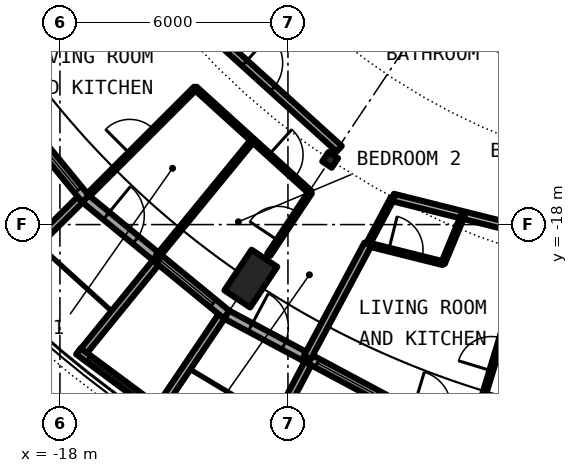
"""IFC4 building model, lengths in metres.
Left out: names, types, materials, properties, quantities, classifications, styles, units other than length and angle.
Written with IfcOpenShell. Run it as: python <this file> out.ifc"""

import sys

from ifc_helpers import new_model, si_unit, direction, frame, frame_2d, origin, origin_2d, place, context, subcontext, project, spatial, rectangle, circle, hollow_circle, i_section, extrude, element, fill, save


model = new_model("IFC4")
c1 = context("Model", 3, precision=1e-05, world=origin(), true_north=direction((0.0, 1.0)))
c2 = subcontext(c1, "Body", "Model", "MODEL_VIEW")
j1 = project(units=[si_unit("LENGTHUNIT", "METRE"), si_unit("PLANEANGLEUNIT", "RADIAN")], contexts=[c1])
p1 = place(None, origin())
s1 = spatial("IfcSite", under=j1, at=p1, CompositionType="ELEMENT")
p2 = place(p1, origin())
s2 = spatial("IfcBuilding", under=s1, at=p2, CompositionType="ELEMENT")
p3 = place(p2, frame((0.0, 0.0, 246.25)))
s3 = spatial("IfcBuildingStorey", under=s2, at=p3, CompositionType="ELEMENT", Elevation=246.25)
p4 = place(p3, frame((-13.334, -19.955, 0.0), z_axis=(0.231767499499, 0.346819263352, 0.908845545043), x_axis=(-0.831436082083, 0.555620411262, 0.0)))
e1 = element("IfcColumn", 1, at=p4, inside=s3, PredefinedType="COLUMN", context=c2, shape_type="SweptSolid", body=[
    extrude(hollow_circle(Radius=0.406, WallThickness=0.03, at=origin_2d()), origin(), (0.0, 0.0, 1.0), 3.081),
])
p5 = place(p3, frame((-10.889, -16.297, 0.0), z_axis=(0.0, 0.0, 1.0), x_axis=(-0.55557023302, -0.831469612303, 0.0)))
e2 = element("IfcColumn", 2, at=p5, inside=s3, PredefinedType="COLUMN", context=c2, shape_type="SweptSolid", body=[
    extrude(i_section(OverallWidth=0.3, OverallDepth=0.3, WebThickness=0.011, FlangeThickness=0.019, FilletRadius=0.027, at=origin_2d()), origin(), (0.0, 0.0, 1.0), 3.05),
])
p6 = place(p3, frame((-20.371, -13.611, 0.0), z_axis=(0.0, 0.0, 1.0), x_axis=(0.634396836208, -0.773007538262, 0.0)))
e3 = element("IfcWall", 3, at=p6, inside=s3, PredefinedType="SOLIDWALL", context=c2, shape_type="SweptSolid", body=[
    extrude(rectangle(XDim=4.803, YDim=0.25, at=frame_2d((2.402, 0.0))), origin(), (0.0, 0.0, 1.0), 2.7),
])
p7 = place(p6, frame((0.704, 0.0, 0.0)))
e4 = element("IfcOpeningElement", 4, at=p7, cuts=e3, PredefinedType="OPENING", context=c2, shape_type="SweptSolid", body=[
    extrude(rectangle(XDim=1.0, YDim=2.2, at=frame_2d((0.5, 1.1))), frame((0.0, 0.135, 0.0), z_axis=(0.0, -1.0, 0.0), x_axis=(1.0, 0.0, 0.0)), (0.0, 0.0, 1.0), 0.27),
])
p8 = place(p6, frame((2.699, 0.0, 0.3)))
e5 = element("IfcOpeningElement", 5, at=p8, cuts=e3, PredefinedType="OPENING", context=c2, shape_type="SweptSolid", body=[
    extrude(rectangle(XDim=1.8, YDim=2.1, at=frame_2d((0.9, 1.05))), frame((0.0, 0.135, 0.0), z_axis=(0.0, -1.0, 0.0), x_axis=(1.0, 0.0, 0.0)), (0.0, 0.0, 1.0), 0.27),
])
p9 = place(p3, frame((-17.47, -17.344, -0.03), z_axis=(0.0, 0.0, 1.0), x_axis=(-0.709896457854, -0.704306055012, 0.0)))
e6 = element("IfcWall", 6, at=p9, inside=s3, PredefinedType="SOLIDWALL", context=c2, shape_type="SweptSolid", body=[
    extrude(rectangle(XDim=2.882, YDim=0.2, at=frame_2d((1.441, 0.0))), origin(), (0.0, 0.0, 1.0), 2.73),
])
p10 = place(p3, frame((-17.324, -17.324, 0.0), z_axis=(0.0, 0.0, 1.0), x_axis=(0.773007538262, -0.634396836208, 0.0)))
e7 = element("IfcWall", 7, at=p10, inside=s3, PredefinedType="SOLIDWALL", context=c2, shape_type="SweptSolid", body=[
    extrude(rectangle(XDim=4.803, YDim=0.25, at=frame_2d((2.402, 0.0))), origin(), (0.0, 0.0, 1.0), 2.7),
])
p11 = place(p10, frame((0.704, 0.0, 0.0)))
e8 = element("IfcOpeningElement", 8, at=p11, cuts=e7, PredefinedType="OPENING", context=c2, shape_type="SweptSolid", body=[
    extrude(rectangle(XDim=1.0, YDim=2.2, at=frame_2d((0.5, 1.1))), frame((0.0, 0.135, 0.0), z_axis=(0.0, -1.0, 0.0), x_axis=(1.0, 0.0, 0.0)), (0.0, 0.0, 1.0), 0.27),
])
p12 = place(p10, frame((2.542, 0.0, 0.3)))
e9 = element("IfcOpeningElement", 9, at=p12, cuts=e7, PredefinedType="OPENING", context=c2, shape_type="SweptSolid", body=[
    extrude(rectangle(XDim=1.8, YDim=2.1, at=frame_2d((0.9, 1.05))), frame((0.0, 0.135, 0.0), z_axis=(0.0, -1.0, 0.0), x_axis=(1.0, 0.0, 0.0)), (0.0, 0.0, 1.0), 0.27),
])
p13 = place(p3, frame((-17.513, -21.332, -0.03), z_axis=(0.0, 0.0, 1.0), x_axis=(0.803211723794, -0.59569365177, 0.0)))
e10 = element("IfcWall", 10, at=p13, inside=s3, PredefinedType="SOLIDWALL", context=c2, shape_type="SweptSolid", body=[
    extrude(rectangle(XDim=2.718, YDim=0.2, at=frame_2d((1.359, 0.0))), origin(), (0.0, 0.0, 1.0), 2.73),
])
p14 = place(p13, frame((0.319, 0.0, 0.33)))
e11 = element("IfcOpeningElement", 11, at=p14, cuts=e10, PredefinedType="OPENING", context=c2, shape_type="SweptSolid", body=[
    extrude(circle(Radius=1.04, at=frame_2d((1.04, 1.04))), frame((0.0, 0.11, 0.0), z_axis=(0.0, -1.0, 0.0), x_axis=(1.0, 0.0, 0.0)), (0.0, 0.0, 1.0), 0.22),
])
p15 = place(p3, frame((-15.479, -19.0, -0.03), z_axis=(0.0, 0.0, 1.0), x_axis=(-0.631209771017, -0.775612161439, 0.0)))
e12 = element("IfcWall", 12, at=p15, inside=s3, PredefinedType="SOLIDWALL", context=c2, shape_type="SweptSolid", body=[
    extrude(rectangle(XDim=2.992, YDim=0.2, at=frame_2d((1.496, 0.0))), origin(), (0.0, 0.0, 1.0), 2.73),
])
p16 = place(p3, frame((-13.75, -20.419, -0.03), z_axis=(0.0, 0.0, 1.0), x_axis=(-0.558934498222, -0.829211810515, 0.0)))
e13 = element("IfcWall", 13, at=p16, inside=s3, PredefinedType="SOLIDWALL", context=c2, shape_type="SweptSolid", body=[
    extrude(rectangle(XDim=2.882, YDim=0.2, at=frame_2d((1.441, 0.0))), origin(), (0.0, 0.0, 1.0), 2.73),
])
p17 = place(p3, frame((-13.611, -20.371, 0.0), z_axis=(0.0, 0.0, 1.0), x_axis=(0.881903608701, -0.471429766731, 0.0)))
e14 = element("IfcWall", 14, at=p17, inside=s3, PredefinedType="SOLIDWALL", context=c2, shape_type="SweptSolid", body=[
    extrude(rectangle(XDim=4.802, YDim=0.25, at=frame_2d((2.401, 0.0))), origin(), (0.0, 0.0, 1.0), 2.7),
])
p18 = place(p17, frame((0.704, 0.0, 0.0)))
e15 = element("IfcOpeningElement", 15, at=p18, cuts=e14, PredefinedType="OPENING", context=c2, shape_type="SweptSolid", body=[
    extrude(rectangle(XDim=1.0, YDim=2.2, at=frame_2d((0.5, 1.1))), frame((0.0, 0.135, 0.0), z_axis=(0.0, -1.0, 0.0), x_axis=(1.0, 0.0, 0.0)), (0.0, 0.0, 1.0), 0.27),
])
p19 = place(p17, frame((2.699, 0.0, 0.3)))
e16 = element("IfcOpeningElement", 16, at=p19, cuts=e14, PredefinedType="OPENING", context=c2, shape_type="SweptSolid", body=[
    extrude(rectangle(XDim=1.8, YDim=2.1, at=frame_2d((0.9, 1.05))), frame((0.0, 0.135, 0.0), z_axis=(0.0, -1.0, 0.0), x_axis=(1.0, 0.0, 0.0)), (0.0, 0.0, 1.0), 0.27),
])
p20 = place(p3, frame((-11.475, -21.655, -0.03), z_axis=(0.0, 0.0, 1.0), x_axis=(-0.467917715158, -0.883772036128, 0.0)))
e17 = element("IfcWall", 17, at=p20, inside=s3, PredefinedType="SOLIDWALL", context=c2, shape_type="SweptSolid", body=[
    extrude(rectangle(XDim=2.992, YDim=0.2, at=frame_2d((1.496, 0.0))), origin(), (0.0, 0.0, 1.0), 2.73),
])
p21 = place(p3, frame((-14.437, -14.409, 0.0), z_axis=(0.0, 0.0, 1.0), x_axis=(0.740802780294, -0.671722592078, 0.0)))
e18 = element("IfcWall", 18, at=p21, inside=s3, PredefinedType="PARTITIONING", context=c2, shape_type="SweptSolid", body=[
    extrude(rectangle(XDim=4.082, YDim=0.1, at=frame_2d((2.041, 0.0))), origin(), (0.0, 0.0, 1.0), 2.7),
])
p22 = place(p21, frame((2.612, 0.0, 0.0)))
e19 = element("IfcOpeningElement", 19, at=p22, cuts=e18, PredefinedType="OPENING", context=c2, shape_type="SweptSolid", body=[
    extrude(rectangle(XDim=0.9, YDim=2.3, at=frame_2d((0.45, 1.15))), frame((0.0, 0.06, 0.0), z_axis=(0.0, -1.0, 0.0), x_axis=(1.0, 0.0, 0.0)), (0.0, 0.0, 1.0), 0.12),
])
p23 = place(p3, frame((-9.899, -18.52, 0.0), z_axis=(0.0, 0.0, 1.0), x_axis=(0.970015724797, -0.243042164339, 0.0)))
e20 = element("IfcWall", 20, at=p23, inside=s3, PredefinedType="PARTITIONING", context=c2, shape_type="SweptSolid", body=[
    extrude(rectangle(XDim=2.041, YDim=0.1, at=frame_2d((1.021, 0.0))), origin(), (0.0, 0.0, 1.0), 2.7),
])
p24 = place(p23, frame((0.571, 0.0, 0.0)))
e21 = element("IfcOpeningElement", 21, at=p24, cuts=e20, PredefinedType="OPENING", context=c2, shape_type="SweptSolid", body=[
    extrude(rectangle(XDim=0.9, YDim=2.3, at=frame_2d((0.45, 1.15))), frame((0.0, 0.06, 0.0), z_axis=(0.0, -1.0, 0.0), x_axis=(1.0, 0.0, 0.0)), (0.0, 0.0, 1.0), 0.12),
])
p25 = place(p3, frame((-16.182, -10.993, 0.0), z_axis=(0.0, 0.0, 1.0), x_axis=(0.740939653983, -0.671571611339, 0.0)))
e22 = element("IfcWall", 22, at=p25, inside=s3, PredefinedType="PARTITIONING", context=c2, shape_type="SweptSolid", body=[
    extrude(rectangle(XDim=7.465, YDim=0.2, at=frame_2d((3.732, 0.0))), origin(), (0.0, 0.0, 1.0), 2.45),
])
p26 = place(p25, frame((4.107, 0.0, 0.0)))
e23 = element("IfcOpeningElement", 23, at=p26, cuts=e22, PredefinedType="OPENING", context=c2, shape_type="SweptSolid", body=[
    extrude(rectangle(XDim=1.0, YDim=2.3, at=frame_2d((0.5, 1.15))), frame((0.0, 0.11, 0.0), z_axis=(0.0, -1.0, 0.0), x_axis=(1.0, 0.0, 0.0)), (0.0, 0.0, 1.0), 0.22),
])
p27 = place(p3, frame((-9.237, -17.287, 0.0), z_axis=(0.0, 0.0, 1.0), x_axis=(0.970050470638, -0.242903446691, 0.0)))
e24 = element("IfcWall", 24, at=p27, inside=s3, PredefinedType="PARTITIONING", context=c2, shape_type="SweptSolid", body=[
    extrude(rectangle(XDim=9.526, YDim=0.2, at=frame_2d((4.763, 0.0))), origin(), (0.0, 0.0, 1.0), 2.45),
])
p28 = place(p27, frame((4.26, 0.0, 0.0)))
e25 = element("IfcOpeningElement", 25, at=p28, cuts=e24, PredefinedType="OPENING", context=c2, shape_type="SweptSolid", body=[
    extrude(rectangle(XDim=1.0, YDim=2.3, at=frame_2d((0.5, 1.15))), frame((0.0, 0.11, 0.0), z_axis=(0.0, -1.0, 0.0), x_axis=(1.0, 0.0, 0.0)), (0.0, 0.0, 1.0), 0.22),
])
p29 = place(p3, frame((-10.226, -10.177, 0.0), z_axis=(0.0, 0.0, 1.0), x_axis=(0.773071783484, -0.634318545828, 0.0)))
e26 = element("IfcWall", 26, at=p29, inside=s3, PredefinedType="PARTITIONING", context=c2, shape_type="SweptSolid", body=[
    extrude(rectangle(XDim=5.803, YDim=0.2, at=frame_2d((2.901, 0.0))), origin(), (0.0, 0.0, 1.0), 2.7),
])
p30 = place(p29, frame((0.949, 0.0, 0.0)))
e27 = element("IfcOpeningElement", 27, at=p30, cuts=e26, PredefinedType="OPENING", context=c2, shape_type="SweptSolid", body=[
    extrude(rectangle(XDim=1.0, YDim=2.3, at=frame_2d((0.5, 1.15))), frame((0.0, 0.11, 0.0), z_axis=(0.0, -1.0, 0.0), x_axis=(1.0, 0.0, 0.0)), (0.0, 0.0, 1.0), 0.22),
])
p31 = place(p3, frame((-17.252, -17.219, 0.0), z_axis=(0.0, 0.0, 1.0), x_axis=(0.707720109647, 0.706492920277, 0.0)))
e28 = element("IfcWall", 28, at=p31, inside=s3, PredefinedType="PARTITIONING", context=c2, shape_type="SweptSolid", body=[
    extrude(rectangle(XDim=3.979, YDim=0.1, at=frame_2d((1.989, 0.0))), origin(), (0.0, 0.0, 1.0), 2.7),
])
p32 = place(p31, frame((1.539, 0.0, 0.0)))
e29 = element("IfcOpeningElement", 29, at=p32, cuts=e28, PredefinedType="OPENING", context=c2, shape_type="SweptSolid", body=[
    extrude(rectangle(XDim=0.9, YDim=2.3, at=frame_2d((0.45, 1.15))), frame((0.0, 0.06, 0.0), z_axis=(0.0, -1.0, 0.0), x_axis=(1.0, 0.0, 0.0)), (0.0, 0.0, 1.0), 0.12),
])
p33 = place(p3, frame((-15.445, -18.857, 0.0), z_axis=(0.0, 0.0, 1.0), x_axis=(0.633648720881, 0.77362090104, 0.0)))
e30 = element("IfcWall", 30, at=p33, inside=s3, PredefinedType="PARTITIONING", context=c2, shape_type="SweptSolid", body=[
    extrude(rectangle(XDim=3.979, YDim=0.1, at=frame_2d((1.989, 0.0))), origin(), (0.0, 0.0, 1.0), 2.7),
])
p34 = place(p3, frame((-12.505, -18.793, 0.0), z_axis=(0.0, 0.0, 1.0), x_axis=(0.553786211634, 0.832658892827, 0.0)))
e31 = element("IfcWall", 31, at=p34, inside=s3, PredefinedType="PARTITIONING", context=c2, shape_type="SweptSolid", body=[
    extrude(rectangle(XDim=1.973, YDim=0.1, at=frame_2d((0.987, 0.0))), origin(), (0.0, 0.0, 1.0), 2.7),
])
p35 = place(p34, frame((0.448, 0.0, 0.0)))
e32 = element("IfcOpeningElement", 32, at=p35, cuts=e31, PredefinedType="OPENING", context=c2, shape_type="SweptSolid", body=[
    extrude(rectangle(XDim=0.9, YDim=2.3, at=frame_2d((0.45, 1.15))), frame((0.0, 0.06, 0.0), z_axis=(0.0, -1.0, 0.0), x_axis=(1.0, 0.0, 0.0)), (0.0, 0.0, 1.0), 0.12),
])
p36 = place(p3, frame((-11.49, -21.497, 0.0), z_axis=(0.0, 0.0, 1.0), x_axis=(0.471350113087, 0.881946183671, 0.0)))
e33 = element("IfcWall", 33, at=p36, inside=s3, PredefinedType="PARTITIONING", context=c2, shape_type="SweptSolid", body=[
    extrude(rectangle(XDim=3.375, YDim=0.2, at=frame_2d((1.688, 0.0))), origin(), (0.0, 0.0, 1.0), 2.7),
])
p37 = place(p3, frame((-7.098, -23.319, 0.0), z_axis=(0.0, 0.0, 1.0), x_axis=(0.290993158272, 0.956725133901, 0.0)))
e34 = element("IfcWall", 34, at=p37, inside=s3, PredefinedType="PARTITIONING", context=c2, shape_type="SweptSolid", body=[
    extrude(rectangle(XDim=3.979, YDim=0.1, at=frame_2d((1.99, 0.0))), origin(), (0.0, 0.0, 1.0), 2.7),
])
p38 = place(p37, frame((1.54, 0.0, 0.0)))
e35 = element("IfcOpeningElement", 35, at=p38, cuts=e34, PredefinedType="OPENING", context=c2, shape_type="SweptSolid", body=[
    extrude(rectangle(XDim=0.9, YDim=2.3, at=frame_2d((0.45, 1.15))), frame((0.0, 0.06, 0.0), z_axis=(0.0, -1.0, 0.0), x_axis=(1.0, 0.0, 0.0)), (0.0, 0.0, 1.0), 0.12),
])
p39 = place(p3, frame((-7.919, -19.016, 0.0), z_axis=(0.0, 0.0, 1.0), x_axis=(0.383933109884, 0.923360908386, 0.0)))
e36 = element("IfcWall", 36, at=p39, inside=s3, PredefinedType="PARTITIONING", context=c2, shape_type="SweptSolid", body=[
    extrude(rectangle(XDim=1.372, YDim=0.1, at=frame_2d((0.686, 0.0))), origin(), (0.0, 0.0, 1.0), 2.7),
])
p40 = place(p3, frame((-9.889, -18.502, 0.0), z_axis=(0.0, 0.0, 1.0), x_axis=(0.471138605408, 0.882059189904, 0.0)))
e37 = element("IfcWall", 37, at=p40, inside=s3, PredefinedType="PARTITIONING", context=c2, shape_type="SweptSolid", body=[
    extrude(rectangle(XDim=1.358, YDim=0.1, at=frame_2d((0.679, 0.0))), origin(), (0.0, 0.0, 1.0), 2.7),
])
p41 = place(p8, origin())
e38 = element("IfcWindow", 38, at=p41, inside=s3, PartitioningType="SINGLE_PANEL", PredefinedType="WINDOW", context=c2, shape_type="SweptSolid", body=[
    extrude(rectangle(XDim=1.8, YDim=2.1, at=frame_2d((0.9, 1.05))), frame((0.0, 0.03, 0.0), z_axis=(0.0, -1.0, 0.0), x_axis=(1.0, 0.0, 0.0)), (0.0, 0.0, 1.0), 0.06),
])
fill(e5, e38)
p42 = place(p11, origin())
e39 = element("IfcDoor", 39, at=p42, inside=s3, OperationType="SINGLE_SWING_LEFT", PredefinedType="DOOR", context=c2, shape_type="SweptSolid", body=[
    extrude(rectangle(XDim=1.0, YDim=2.2, at=frame_2d((0.5, 1.1))), frame((0.0, 0.025, 0.0), z_axis=(0.0, -1.0, 0.0), x_axis=(1.0, 0.0, 0.0)), (0.0, 0.0, 1.0), 0.05),
])
fill(e8, e39)
p43 = place(p12, origin())
e40 = element("IfcWindow", 40, at=p43, inside=s3, PartitioningType="SINGLE_PANEL", PredefinedType="WINDOW", context=c2, shape_type="SweptSolid", body=[
    extrude(rectangle(XDim=1.8, YDim=2.1, at=frame_2d((0.9, 1.05))), frame((0.0, 0.03, 0.0), z_axis=(0.0, -1.0, 0.0), x_axis=(1.0, 0.0, 0.0)), (0.0, 0.0, 1.0), 0.06),
])
fill(e9, e40)
p44 = place(p14, origin())
e41 = element("IfcWindow", 41, at=p44, inside=s3, PartitioningType="SINGLE_PANEL", PredefinedType="WINDOW", context=c2, shape_type="SweptSolid", body=[
    extrude(circle(Radius=1.04, at=frame_2d((1.04, 1.04))), frame((0.0, 0.03, 0.0), z_axis=(0.0, -1.0, 0.0), x_axis=(1.0, 0.0, 0.0)), (0.0, 0.0, 1.0), 0.06),
])
fill(e11, e41)
p45 = place(p18, origin())
e42 = element("IfcDoor", 42, at=p45, inside=s3, OperationType="SINGLE_SWING_LEFT", PredefinedType="DOOR", context=c2, shape_type="SweptSolid", body=[
    extrude(rectangle(XDim=1.0, YDim=2.2, at=frame_2d((0.5, 1.1))), frame((0.0, 0.025, 0.0), z_axis=(0.0, -1.0, 0.0), x_axis=(1.0, 0.0, 0.0)), (0.0, 0.0, 1.0), 0.05),
])
fill(e15, e42)
p46 = place(p19, origin())
e43 = element("IfcWindow", 43, at=p46, inside=s3, PartitioningType="SINGLE_PANEL", PredefinedType="WINDOW", context=c2, shape_type="SweptSolid", body=[
    extrude(rectangle(XDim=1.8, YDim=2.1, at=frame_2d((0.9, 1.05))), frame((0.0, 0.03, 0.0), z_axis=(0.0, -1.0, 0.0), x_axis=(1.0, 0.0, 0.0)), (0.0, 0.0, 1.0), 0.06),
])
fill(e16, e43)
p47 = place(p26, origin())
e44 = element("IfcDoor", 44, at=p47, inside=s3, OperationType="SINGLE_SWING_RIGHT", PredefinedType="DOOR", context=c2, shape_type="SweptSolid", body=[
    extrude(rectangle(XDim=1.0, YDim=2.3, at=frame_2d((0.5, 1.15))), frame((0.0, 0.025, 0.0), z_axis=(0.0, -1.0, 0.0), x_axis=(1.0, 0.0, 0.0)), (0.0, 0.0, 1.0), 0.05),
])
fill(e23, e44)
p48 = place(p32, origin())
e45 = element("IfcDoor", 45, at=p48, inside=s3, OperationType="SINGLE_SWING_RIGHT", PredefinedType="DOOR", context=c2, shape_type="SweptSolid", body=[
    extrude(rectangle(XDim=0.9, YDim=2.3, at=frame_2d((0.45, 1.15))), frame((0.0, 0.025, 0.0), z_axis=(0.0, -1.0, 0.0), x_axis=(1.0, 0.0, 0.0)), (0.0, 0.0, 1.0), 0.05),
])
fill(e29, e45)
p49 = place(p22, origin())
e46 = element("IfcDoor", 46, at=p49, inside=s3, OperationType="SINGLE_SWING_RIGHT", PredefinedType="DOOR", context=c2, shape_type="SweptSolid", body=[
    extrude(rectangle(XDim=0.9, YDim=2.3, at=frame_2d((0.45, 1.15))), frame((0.0, 0.025, 0.0), z_axis=(0.0, -1.0, 0.0), x_axis=(1.0, 0.0, 0.0)), (0.0, 0.0, 1.0), 0.05),
])
fill(e19, e46)
p50 = place(p35, origin())
e47 = element("IfcDoor", 47, at=p50, inside=s3, OperationType="SINGLE_SWING_LEFT", PredefinedType="DOOR", context=c2, shape_type="SweptSolid", body=[
    extrude(rectangle(XDim=0.9, YDim=2.3, at=frame_2d((0.45, 1.15))), frame((0.0, 0.025, 0.0), z_axis=(0.0, -1.0, 0.0), x_axis=(1.0, 0.0, 0.0)), (0.0, 0.0, 1.0), 0.05),
])
fill(e32, e47)
p51 = place(p24, origin())
e48 = element("IfcDoor", 48, at=p51, inside=s3, OperationType="SINGLE_SWING_RIGHT", PredefinedType="DOOR", context=c2, shape_type="SweptSolid", body=[
    extrude(rectangle(XDim=0.9, YDim=2.3, at=frame_2d((0.45, 1.15))), frame((0.0, 0.025, 0.0), z_axis=(0.0, -1.0, 0.0), x_axis=(1.0, 0.0, 0.0)), (0.0, 0.0, 1.0), 0.05),
])
fill(e21, e48)
p52 = place(p38, origin())
e49 = element("IfcDoor", 49, at=p52, inside=s3, OperationType="SINGLE_SWING_LEFT", PredefinedType="DOOR", context=c2, shape_type="SweptSolid", body=[
    extrude(rectangle(XDim=0.9, YDim=2.3, at=frame_2d((0.45, 1.15))), frame((0.0, 0.025, 0.0), z_axis=(0.0, -1.0, 0.0), x_axis=(1.0, 0.0, 0.0)), (0.0, 0.0, 1.0), 0.05),
])
fill(e35, e49)
save(model, sys.argv[1])
